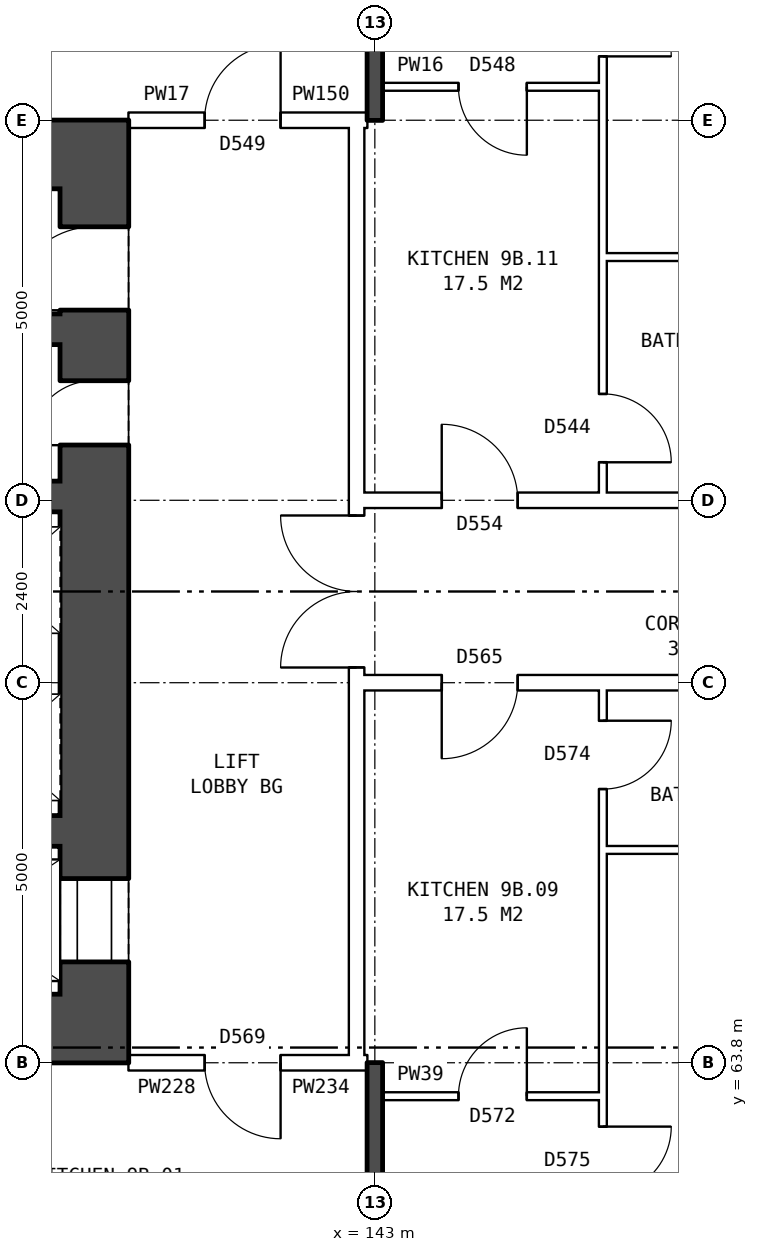
"""IFC4 building model, lengths in metres.
Left out: names, types, materials, properties, quantities, classifications, styles, units other than length and angle.
Written with IfcOpenShell. Run it as: python <this file> out.ifc"""

import sys

from ifc_helpers import new_model, si_unit, direction, frame, frame_2d, origin, place, context, subcontext, project, spatial, rectangle, extrude, element, fill, save


model = new_model("IFC4")
c1 = context("Model", 3, precision=1e-05, world=origin(), true_north=direction((0.0, 1.0)))
c2 = subcontext(c1, "Body", "Model", "MODEL_VIEW")
j1 = project(units=[si_unit("LENGTHUNIT", "METRE"), si_unit("PLANEANGLEUNIT", "RADIAN")], contexts=[c1])
p1 = place(None, origin())
s1 = spatial("IfcSite", under=j1, at=p1, CompositionType="ELEMENT")
p2 = place(p1, origin())
s2 = spatial("IfcBuilding", under=s1, at=p2, CompositionType="ELEMENT")
p3 = place(p2, frame((0.0, 0.0, 35.0)))
s3 = spatial("IfcBuildingStorey", under=s2, at=p3, CompositionType="ELEMENT", Elevation=35.0)
p4 = place(p3, frame((139.31, 64.7, 0.0), z_axis=(0.0, 0.0, 1.0), x_axis=(0.0, 1.0, 0.0)))
e1 = element("IfcWall", 1, at=p4, inside=s3, PredefinedType="SHEAR", context=c2, shape_type="SweptSolid", body=[
    extrude(rectangle(XDim=10.6, YDim=0.9, at=frame_2d((5.3, 0.0))), origin(), (0.0, 0.0, 1.0), 2.85),
])
p5 = place(p4, frame((0.425, 0.0, 0.0)))
e2 = element("IfcOpeningElement", 2, at=p5, cuts=e1, PredefinedType="OPENING", context=c2, shape_type="SweptSolid", body=[
    extrude(rectangle(XDim=1.1, YDim=2.1, at=frame_2d((0.55, 1.05))), frame((0.0, 0.46, 0.0), z_axis=(0.0, -1.0, 0.0), x_axis=(1.0, 0.0, 0.0)), (0.0, 0.0, 1.0), 0.92),
])
p6 = place(p4, frame((9.0, 0.0, 0.0)))
e3 = element("IfcOpeningElement", 3, at=p6, cuts=e1, PredefinedType="OPENING", context=c2, shape_type="SweptSolid", body=[
    extrude(rectangle(XDim=1.1, YDim=2.1, at=frame_2d((0.55, 1.05))), frame((0.0, 0.46, 0.0), z_axis=(0.0, -1.0, 0.0), x_axis=(1.0, 0.0, 0.0)), (0.0, 0.0, 1.0), 0.92),
])
p7 = place(p4, frame((7.225, 0.0, 0.0)))
e4 = element("IfcOpeningElement", 4, at=p7, cuts=e1, PredefinedType="OPENING", context=c2, shape_type="SweptSolid", body=[
    extrude(rectangle(XDim=0.85, YDim=2.1, at=frame_2d((0.425, 1.05))), frame((0.0, 0.46, 0.0), z_axis=(0.0, -1.0, 0.0), x_axis=(1.0, 0.0, 0.0)), (0.0, 0.0, 1.0), 0.92),
])
for number, where, z_axis, x_axis in (
    (5, (139.76, 64.25, 0.0), (0.0, 0.0, 1.0), (-1.0, 0.0, 0.0)),
    (6, (139.76, 75.75, 0.0), (0.0, 0.0, 1.0), (-1.0, 0.0, 0.0)),
):
    element("IfcWall", number, at=place(p3, frame(where, z_axis=z_axis, x_axis=x_axis)), inside=s3, PredefinedType="SHEAR", context=c2, shape_type="SweptSolid", body=[
        extrude(rectangle(XDim=8.4, YDim=0.9, at=frame_2d((4.2, 0.0))), origin(), (0.0, 0.0, 1.0), 2.85),
    ])
p8 = place(p3, frame((138.86, 66.85, 0.0), z_axis=(0.0, 0.0, 1.0), x_axis=(-1.0, 0.0, 0.0)))
e7 = element("IfcWall", 7, at=p8, inside=s3, PredefinedType="SHEAR", context=c2, shape_type="SweptSolid", body=[
    extrude(rectangle(XDim=3.7, YDim=0.4, at=frame_2d((1.85, 0.0))), origin(), (0.0, 0.0, 1.0), 2.85),
])
p9 = place(p3, frame((138.86, 71.25, 0.0), z_axis=(0.0, 0.0, 1.0), x_axis=(-1.0, 0.0, 0.0)))
e8 = element("IfcWall", 8, at=p9, inside=s3, PredefinedType="SHEAR", context=c2, shape_type="SweptSolid", body=[
    extrude(rectangle(XDim=6.6, YDim=0.4, at=frame_2d((3.3, 0.0))), origin(), (0.0, 0.0, 1.0), 2.85),
])
p10 = place(p9, frame((4.25, 0.0, 0.0)))
e9 = element("IfcOpeningElement", 9, at=p10, cuts=e8, PredefinedType="OPENING", context=c2, shape_type="SweptSolid", body=[
    extrude(rectangle(XDim=1.1, YDim=2.1, at=frame_2d((0.55, 1.05))), frame((0.0, 0.21, 0.0), z_axis=(0.0, -1.0, 0.0), x_axis=(1.0, 0.0, 0.0)), (0.0, 0.0, 1.0), 0.42),
])
p11 = place(p9, frame((2.6, 0.0, 0.0)))
e10 = element("IfcOpeningElement", 10, at=p11, cuts=e8, PredefinedType="OPENING", context=c2, shape_type="SweptSolid", body=[
    extrude(rectangle(XDim=0.85, YDim=2.1, at=frame_2d((0.425, 1.05))), frame((0.0, 0.21, 0.0), z_axis=(0.0, -1.0, 0.0), x_axis=(1.0, 0.0, 0.0)), (0.0, 0.0, 1.0), 0.42),
])
p12 = place(p3, frame((138.86, 73.45, 0.0), z_axis=(0.0, 0.0, 1.0), x_axis=(-1.0, 0.0, 0.0)))
e11 = element("IfcWall", 11, at=p12, inside=s3, PredefinedType="SHEAR", context=c2, shape_type="SweptSolid", body=[
    extrude(rectangle(XDim=1.95, YDim=0.4, at=frame_2d((0.975, 0.0))), origin(), (0.0, 0.0, 1.0), 2.85),
])
p13 = place(p3, frame((142.76, 63.9, 0.0), z_axis=(0.0, 0.0, 1.0), x_axis=(0.0, 1.0, 0.0)))
e12 = element("IfcWall", 12, at=p13, inside=s3, PredefinedType="PARTITIONING", context=c2, shape_type="SweptSolid", body=[
    extrude(rectangle(XDim=12.2, YDim=0.2, at=frame_2d((6.1, 0.0))), origin(), (0.0, 0.0, 1.0), 2.85),
])
p14 = place(p13, frame((5.1, 0.0, 0.0)))
e13 = element("IfcOpeningElement", 13, at=p14, cuts=e12, PredefinedType="OPENING", context=c2, shape_type="SweptSolid", body=[
    extrude(rectangle(XDim=2.0, YDim=2.1, at=frame_2d((1.0, 1.05))), frame((0.0, 0.11, 0.0), z_axis=(0.0, -1.0, 0.0), x_axis=(1.0, 0.0, 0.0)), (0.0, 0.0, 1.0), 0.22),
])
p15 = place(p3, frame((143.1, 63.36, 0.0), z_axis=(0.0, 0.0, 1.0), x_axis=(1.0, 0.0, 0.0)))
e14 = element("IfcWall", 14, at=p15, inside=s3, PredefinedType="PARTITIONING", context=c2, shape_type="SweptSolid", body=[
    extrude(rectangle(XDim=2.9, YDim=0.1, at=frame_2d((1.45, 0.0))), origin(), (0.0, 0.0, 1.0), 2.85),
])
p16 = place(p15, frame((1.0, 0.0, 0.0)))
e15 = element("IfcOpeningElement", 15, at=p16, cuts=e14, PredefinedType="OPENING", context=c2, shape_type="SweptSolid", body=[
    extrude(rectangle(XDim=0.9, YDim=2.1, at=frame_2d((0.45, 1.05))), frame((0.0, 0.06, 0.0), z_axis=(0.0, -1.0, 0.0), x_axis=(1.0, 0.0, 0.0)), (0.0, 0.0, 1.0), 0.12),
])
p17 = place(p3, frame((139.76, 63.8, 0.0), z_axis=(0.0, 0.0, 1.0), x_axis=(1.0, 0.0, 0.0)))
e16 = element("IfcWall", 16, at=p17, inside=s3, PredefinedType="PARTITIONING", context=c2, shape_type="SweptSolid", body=[
    extrude(rectangle(XDim=3.0, YDim=0.2, at=frame_2d((1.5, 0.0))), origin(), (0.0, 0.0, 1.0), 2.85),
])
p18 = place(p17, frame((1.0, 0.0, 0.0)))
e17 = element("IfcOpeningElement", 17, at=p18, cuts=e16, PredefinedType="OPENING", context=c2, shape_type="SweptSolid", body=[
    extrude(rectangle(XDim=1.0, YDim=2.1, at=frame_2d((0.5, 1.05))), frame((0.0, 0.11, 0.0), z_axis=(0.0, -1.0, 0.0), x_axis=(1.0, 0.0, 0.0)), (0.0, 0.0, 1.0), 0.22),
])
p19 = place(p3, frame((142.76, 63.8, 0.0), z_axis=(0.0, 0.0, 1.0), x_axis=(1.0, 0.0, 0.0)))
e18 = element("IfcWall", 18, at=p19, inside=s3, PredefinedType="PARTITIONING", context=c2, shape_type="SweptSolid", body=[
    extrude(rectangle(XDim=0.14, YDim=0.2, at=frame_2d((0.07, 0.0))), origin(), (0.0, 0.0, 1.0), 2.85),
])
p20 = place(p3, frame((146.0, 66.6, 0.0), z_axis=(0.0, 0.0, 1.0), x_axis=(1.0, 0.0, 0.0)))
e19 = element("IfcWall", 19, at=p20, inside=s3, PredefinedType="PARTITIONING", context=c2, shape_type="SweptSolid", body=[
    extrude(rectangle(XDim=2.9, YDim=0.1, at=frame_2d((1.45, 0.0))), origin(), (0.0, 0.0, 1.0), 2.85),
])
p21 = place(p3, frame((142.76, 68.8, 0.0), z_axis=(0.0, 0.0, 1.0), x_axis=(1.0, 0.0, 0.0)))
e20 = element("IfcWall", 20, at=p21, inside=s3, PredefinedType="PARTITIONING", context=c2, shape_type="SweptSolid", body=[
    extrude(rectangle(XDim=14.48, YDim=0.2, at=frame_2d((7.24, 0.0))), origin(), (0.0, 0.0, 1.0), 2.85),
])
p22 = place(p21, frame((1.12, 0.0, 0.0)))
e21 = element("IfcOpeningElement", 21, at=p22, cuts=e20, PredefinedType="OPENING", context=c2, shape_type="SweptSolid", body=[
    extrude(rectangle(XDim=1.0, YDim=2.1, at=frame_2d((0.5, 1.05))), frame((0.0, 0.11, 0.0), z_axis=(0.0, -1.0, 0.0), x_axis=(1.0, 0.0, 0.0)), (0.0, 0.0, 1.0), 0.22),
])
p23 = place(p21, frame((7.24, 0.0, 0.0)))
e22 = element("IfcOpeningElement", 22, at=p23, cuts=e20, PredefinedType="OPENING", context=c2, shape_type="SweptSolid", body=[
    extrude(rectangle(XDim=1.0, YDim=2.1, at=frame_2d((0.5, 1.05))), frame((0.0, 0.11, 0.0), z_axis=(0.0, -1.0, 0.0), x_axis=(1.0, 0.0, 0.0)), (0.0, 0.0, 1.0), 0.22),
])
p24 = place(p3, frame((142.76, 71.2, 0.0), z_axis=(0.0, 0.0, 1.0), x_axis=(1.0, 0.0, 0.0)))
e23 = element("IfcWall", 23, at=p24, inside=s3, PredefinedType="PARTITIONING", context=c2, shape_type="SweptSolid", body=[
    extrude(rectangle(XDim=14.48, YDim=0.2, at=frame_2d((7.24, 0.0))), origin(), (0.0, 0.0, 1.0), 2.85),
])
p25 = place(p24, frame((1.12, 0.0, 0.0)))
e24 = element("IfcOpeningElement", 24, at=p25, cuts=e23, PredefinedType="OPENING", context=c2, shape_type="SweptSolid", body=[
    extrude(rectangle(XDim=1.0, YDim=2.1, at=frame_2d((0.5, 1.05))), frame((0.0, 0.11, 0.0), z_axis=(0.0, -1.0, 0.0), x_axis=(1.0, 0.0, 0.0)), (0.0, 0.0, 1.0), 0.22),
])
p26 = place(p24, frame((10.24, 0.0, 0.0)))
e25 = element("IfcOpeningElement", 25, at=p26, cuts=e23, PredefinedType="OPENING", context=c2, shape_type="SweptSolid", body=[
    extrude(rectangle(XDim=1.0, YDim=2.1, at=frame_2d((0.5, 1.05))), frame((0.0, 0.11, 0.0), z_axis=(0.0, -1.0, 0.0), x_axis=(1.0, 0.0, 0.0)), (0.0, 0.0, 1.0), 0.22),
])
p27 = place(p3, frame((146.0, 74.4, 0.0), z_axis=(0.0, 0.0, 1.0), x_axis=(1.0, 0.0, 0.0)))
e26 = element("IfcWall", 26, at=p27, inside=s3, PredefinedType="PARTITIONING", context=c2, shape_type="SweptSolid", body=[
    extrude(rectangle(XDim=2.9, YDim=0.1, at=frame_2d((1.45, 0.0))), origin(), (0.0, 0.0, 1.0), 2.85),
])
p28 = place(p3, frame((139.76, 76.2, 0.0), z_axis=(0.0, 0.0, 1.0), x_axis=(1.0, 0.0, 0.0)))
e27 = element("IfcWall", 27, at=p28, inside=s3, PredefinedType="PARTITIONING", context=c2, shape_type="SweptSolid", body=[
    extrude(rectangle(XDim=3.0, YDim=0.2, at=frame_2d((1.5, 0.0))), origin(), (0.0, 0.0, 1.0), 2.85),
])
p29 = place(p28, frame((1.0, 0.0, 0.0)))
e28 = element("IfcOpeningElement", 28, at=p29, cuts=e27, PredefinedType="OPENING", context=c2, shape_type="SweptSolid", body=[
    extrude(rectangle(XDim=1.0, YDim=2.1, at=frame_2d((0.5, 1.05))), frame((0.0, 0.11, 0.0), z_axis=(0.0, -1.0, 0.0), x_axis=(1.0, 0.0, 0.0)), (0.0, 0.0, 1.0), 0.22),
])
p30 = place(p3, frame((142.76, 76.2, 0.0), z_axis=(0.0, 0.0, 1.0), x_axis=(1.0, 0.0, 0.0)))
e29 = element("IfcWall", 29, at=p30, inside=s3, PredefinedType="PARTITIONING", context=c2, shape_type="SweptSolid", body=[
    extrude(rectangle(XDim=0.14, YDim=0.2, at=frame_2d((0.07, 0.0))), origin(), (0.0, 0.0, 1.0), 2.85),
])
p31 = place(p3, frame((143.1, 76.64, 0.0), z_axis=(0.0, 0.0, 1.0), x_axis=(1.0, 0.0, 0.0)))
e30 = element("IfcWall", 30, at=p31, inside=s3, PredefinedType="PARTITIONING", context=c2, shape_type="SweptSolid", body=[
    extrude(rectangle(XDim=2.9, YDim=0.1, at=frame_2d((1.45, 0.0))), origin(), (0.0, 0.0, 1.0), 2.85),
])
p32 = place(p31, frame((1.0, 0.0, 0.0)))
e31 = element("IfcOpeningElement", 31, at=p32, cuts=e30, PredefinedType="OPENING", context=c2, shape_type="SweptSolid", body=[
    extrude(rectangle(XDim=0.9, YDim=2.1, at=frame_2d((0.45, 1.05))), frame((0.0, 0.06, 0.0), z_axis=(0.0, -1.0, 0.0), x_axis=(1.0, 0.0, 0.0)), (0.0, 0.0, 1.0), 0.12),
])
for number, where, z_axis, x_axis in (
    (32, (143.0, 54.36, 0.0), (0.0, 0.0, 1.0), (0.0, 1.0, 0.0)),
    (33, (143.0, 76.2, 0.0), (0.0, 0.0, 1.0), (0.0, 1.0, 0.0)),
):
    element("IfcWall", number, at=place(p3, frame(where, z_axis=z_axis, x_axis=x_axis)), inside=s3, PredefinedType="SOLIDWALL", context=c2, shape_type="SweptSolid", body=[
        extrude(rectangle(XDim=9.44, YDim=0.2, at=frame_2d((4.72, 0.0))), origin(), (0.0, 0.0, 1.0), 2.85),
    ])
p33 = place(p3, frame((146.0, 54.36, 0.0), z_axis=(0.0, 0.0, 1.0), x_axis=(0.0, 1.0, 0.0)))
e34 = element("IfcWall", 34, at=p33, inside=s3, PredefinedType="PARTITIONING", context=c2, shape_type="SweptSolid", body=[
    extrude(rectangle(XDim=14.34, YDim=0.1, at=frame_2d((7.17, 0.0))), origin(), (0.0, 0.0, 1.0), 2.85),
])
p34 = place(p33, frame((7.7, 0.0, 0.0)))
e35 = element("IfcOpeningElement", 35, at=p34, cuts=e34, PredefinedType="OPENING", context=c2, shape_type="SweptSolid", body=[
    extrude(rectangle(XDim=0.9, YDim=2.1, at=frame_2d((0.45, 1.05))), frame((0.0, 0.06, 0.0), z_axis=(0.0, -1.0, 0.0), x_axis=(1.0, 0.0, 0.0)), (0.0, 0.0, 1.0), 0.12),
])
p35 = place(p33, frame((13.04, 0.0, 0.0)))
e36 = element("IfcOpeningElement", 36, at=p35, cuts=e34, PredefinedType="OPENING", context=c2, shape_type="SweptSolid", body=[
    extrude(rectangle(XDim=0.9, YDim=2.1, at=frame_2d((0.45, 1.05))), frame((0.0, 0.06, 0.0), z_axis=(0.0, -1.0, 0.0), x_axis=(1.0, 0.0, 0.0)), (0.0, 0.0, 1.0), 0.12),
])
p36 = place(p3, frame((146.0, 71.3, 0.0), z_axis=(0.0, 0.0, 1.0), x_axis=(0.0, 1.0, 0.0)))
e37 = element("IfcWall", 37, at=p36, inside=s3, PredefinedType="PARTITIONING", context=c2, shape_type="SweptSolid", body=[
    extrude(rectangle(XDim=14.34, YDim=0.1, at=frame_2d((7.17, 0.0))), origin(), (0.0, 0.0, 1.0), 2.85),
])
p37 = place(p36, frame((5.74, 0.0, 0.0)))
e38 = element("IfcOpeningElement", 38, at=p37, cuts=e37, PredefinedType="OPENING", context=c2, shape_type="SweptSolid", body=[
    extrude(rectangle(XDim=0.9, YDim=2.1, at=frame_2d((0.45, 1.05))), frame((0.0, 0.06, 0.0), z_axis=(0.0, -1.0, 0.0), x_axis=(1.0, 0.0, 0.0)), (0.0, 0.0, 1.0), 0.12),
])
p38 = place(p36, frame((0.4, 0.0, 0.0)))
e39 = element("IfcOpeningElement", 39, at=p38, cuts=e37, PredefinedType="OPENING", context=c2, shape_type="SweptSolid", body=[
    extrude(rectangle(XDim=0.9, YDim=2.1, at=frame_2d((0.45, 1.05))), frame((0.0, 0.06, 0.0), z_axis=(0.0, -1.0, 0.0), x_axis=(1.0, 0.0, 0.0)), (0.0, 0.0, 1.0), 0.12),
])
p39 = place(p5, origin())
e40 = element("IfcDoor", 40, at=p39, inside=s3, OperationType="DOUBLE_DOOR_SLIDING", PredefinedType="DOOR", context=c2, shape_type="SweptSolid", body=[
    extrude(rectangle(XDim=1.1, YDim=2.1, at=frame_2d((0.55, 1.05))), frame((0.0, 0.435, 0.0), z_axis=(0.0, -1.0, 0.0), x_axis=(1.0, 0.0, 0.0)), (0.0, 0.0, 1.0), 0.05),
])
fill(e2, e40)
p40 = place(p6, origin())
e41 = element("IfcDoor", 41, at=p40, inside=s3, OperationType="SINGLE_SWING_LEFT", PredefinedType="DOOR", context=c2, shape_type="SweptSolid", body=[
    extrude(rectangle(XDim=1.1, YDim=2.1, at=frame_2d((0.55, 1.05))), frame((0.0, 0.435, 0.0), z_axis=(0.0, -1.0, 0.0), x_axis=(1.0, 0.0, 0.0)), (0.0, 0.0, 1.0), 0.05),
])
fill(e3, e41)
p41 = place(p7, origin())
e42 = element("IfcDoor", 42, at=p41, inside=s3, OperationType="SINGLE_SWING_LEFT", PredefinedType="DOOR", context=c2, shape_type="SweptSolid", body=[
    extrude(rectangle(XDim=0.85, YDim=2.1, at=frame_2d((0.425, 1.05))), frame((0.0, 0.435, 0.0), z_axis=(0.0, -1.0, 0.0), x_axis=(1.0, 0.0, 0.0)), (0.0, 0.0, 1.0), 0.05),
])
fill(e4, e42)
p42 = place(p14, origin())
e43 = element("IfcDoor", 43, at=p42, inside=s3, OperationType="DOUBLE_DOOR_SINGLE_SWING", PredefinedType="DOOR", context=c2, shape_type="SweptSolid", body=[
    extrude(rectangle(XDim=2.0, YDim=2.1, at=frame_2d((1.0, 1.05))), frame((0.0, 0.025, 0.0), z_axis=(0.0, -1.0, 0.0), x_axis=(1.0, 0.0, 0.0)), (0.0, 0.0, 1.0), 0.05),
])
fill(e13, e43)
p43 = place(p18, frame((1.0, 0.0, 0.0), z_axis=(0.0, 0.0, 1.0), x_axis=(-1.0, 0.0, 0.0)))
e44 = element("IfcDoor", 44, at=p43, inside=s3, OperationType="SINGLE_SWING_LEFT", PredefinedType="DOOR", context=c2, shape_type="SweptSolid", body=[
    extrude(rectangle(XDim=1.0, YDim=2.1, at=frame_2d((0.5, 1.05))), frame((0.0, 0.025, 0.0), z_axis=(0.0, -1.0, 0.0), x_axis=(1.0, 0.0, 0.0)), (0.0, 0.0, 1.0), 0.05),
])
fill(e17, e44)
p44 = place(p29, origin())
e45 = element("IfcDoor", 45, at=p44, inside=s3, OperationType="SINGLE_SWING_RIGHT", PredefinedType="DOOR", context=c2, shape_type="SweptSolid", body=[
    extrude(rectangle(XDim=1.0, YDim=2.1, at=frame_2d((0.5, 1.05))), frame((0.0, 0.025, 0.0), z_axis=(0.0, -1.0, 0.0), x_axis=(1.0, 0.0, 0.0)), (0.0, 0.0, 1.0), 0.05),
])
fill(e28, e45)
p45 = place(p34, frame((0.9, 0.0, 0.0), z_axis=(0.0, 0.0, 1.0), x_axis=(-1.0, 0.0, 0.0)))
e46 = element("IfcDoor", 46, at=p45, inside=s3, OperationType="SINGLE_SWING_LEFT", PredefinedType="DOOR", context=c2, shape_type="SweptSolid", body=[
    extrude(rectangle(XDim=0.9, YDim=2.1, at=frame_2d((0.45, 1.05))), frame((0.0, 0.025, 0.0), z_axis=(0.0, -1.0, 0.0), x_axis=(1.0, 0.0, 0.0)), (0.0, 0.0, 1.0), 0.05),
])
fill(e35, e46)
p46 = place(p22, frame((1.0, 0.0, 0.0), z_axis=(0.0, 0.0, 1.0), x_axis=(-1.0, 0.0, 0.0)))
e47 = element("IfcDoor", 47, at=p46, inside=s3, OperationType="SINGLE_SWING_RIGHT", PredefinedType="DOOR", context=c2, shape_type="SweptSolid", body=[
    extrude(rectangle(XDim=1.0, YDim=2.1, at=frame_2d((0.5, 1.05))), frame((0.0, 0.025, 0.0), z_axis=(0.0, -1.0, 0.0), x_axis=(1.0, 0.0, 0.0)), (0.0, 0.0, 1.0), 0.05),
])
fill(e21, e47)
p47 = place(p16, origin())
e48 = element("IfcDoor", 48, at=p47, inside=s3, OperationType="SINGLE_SWING_RIGHT", PredefinedType="DOOR", context=c2, shape_type="SweptSolid", body=[
    extrude(rectangle(XDim=0.9, YDim=2.1, at=frame_2d((0.45, 1.05))), frame((0.0, 0.025, 0.0), z_axis=(0.0, -1.0, 0.0), x_axis=(1.0, 0.0, 0.0)), (0.0, 0.0, 1.0), 0.05),
])
fill(e15, e48)
p48 = place(p35, frame((0.9, 0.0, 0.0), z_axis=(0.0, 0.0, 1.0), x_axis=(-1.0, 0.0, 0.0)))
e49 = element("IfcDoor", 49, at=p48, inside=s3, OperationType="SINGLE_SWING_LEFT", PredefinedType="DOOR", context=c2, shape_type="SweptSolid", body=[
    extrude(rectangle(XDim=0.9, YDim=2.1, at=frame_2d((0.45, 1.05))), frame((0.0, 0.025, 0.0), z_axis=(0.0, -1.0, 0.0), x_axis=(1.0, 0.0, 0.0)), (0.0, 0.0, 1.0), 0.05),
])
fill(e36, e49)
p49 = place(p37, frame((0.9, 0.0, 0.0), z_axis=(0.0, 0.0, 1.0), x_axis=(-1.0, 0.0, 0.0)))
e50 = element("IfcDoor", 50, at=p49, inside=s3, OperationType="SINGLE_SWING_RIGHT", PredefinedType="DOOR", context=c2, shape_type="SweptSolid", body=[
    extrude(rectangle(XDim=0.9, YDim=2.1, at=frame_2d((0.45, 1.05))), frame((0.0, 0.025, 0.0), z_axis=(0.0, -1.0, 0.0), x_axis=(1.0, 0.0, 0.0)), (0.0, 0.0, 1.0), 0.05),
])
fill(e38, e50)
p50 = place(p25, origin())
e51 = element("IfcDoor", 51, at=p50, inside=s3, OperationType="SINGLE_SWING_LEFT", PredefinedType="DOOR", context=c2, shape_type="SweptSolid", body=[
    extrude(rectangle(XDim=1.0, YDim=2.1, at=frame_2d((0.5, 1.05))), frame((0.0, 0.025, 0.0), z_axis=(0.0, -1.0, 0.0), x_axis=(1.0, 0.0, 0.0)), (0.0, 0.0, 1.0), 0.05),
])
fill(e24, e51)
p51 = place(p32, frame((0.9, 0.0, 0.0), z_axis=(0.0, 0.0, 1.0), x_axis=(-1.0, 0.0, 0.0)))
e52 = element("IfcDoor", 52, at=p51, inside=s3, OperationType="SINGLE_SWING_LEFT", PredefinedType="DOOR", context=c2, shape_type="SweptSolid", body=[
    extrude(rectangle(XDim=0.9, YDim=2.1, at=frame_2d((0.45, 1.05))), frame((0.0, 0.025, 0.0), z_axis=(0.0, -1.0, 0.0), x_axis=(1.0, 0.0, 0.0)), (0.0, 0.0, 1.0), 0.05),
])
fill(e31, e52)
p52 = place(p38, frame((0.9, 0.0, 0.0), z_axis=(0.0, 0.0, 1.0), x_axis=(-1.0, 0.0, 0.0)))
e53 = element("IfcDoor", 53, at=p52, inside=s3, OperationType="SINGLE_SWING_RIGHT", PredefinedType="DOOR", context=c2, shape_type="SweptSolid", body=[
    extrude(rectangle(XDim=0.9, YDim=2.1, at=frame_2d((0.45, 1.05))), frame((0.0, 0.025, 0.0), z_axis=(0.0, -1.0, 0.0), x_axis=(1.0, 0.0, 0.0)), (0.0, 0.0, 1.0), 0.05),
])
fill(e39, e53)
save(model, sys.argv[1])
